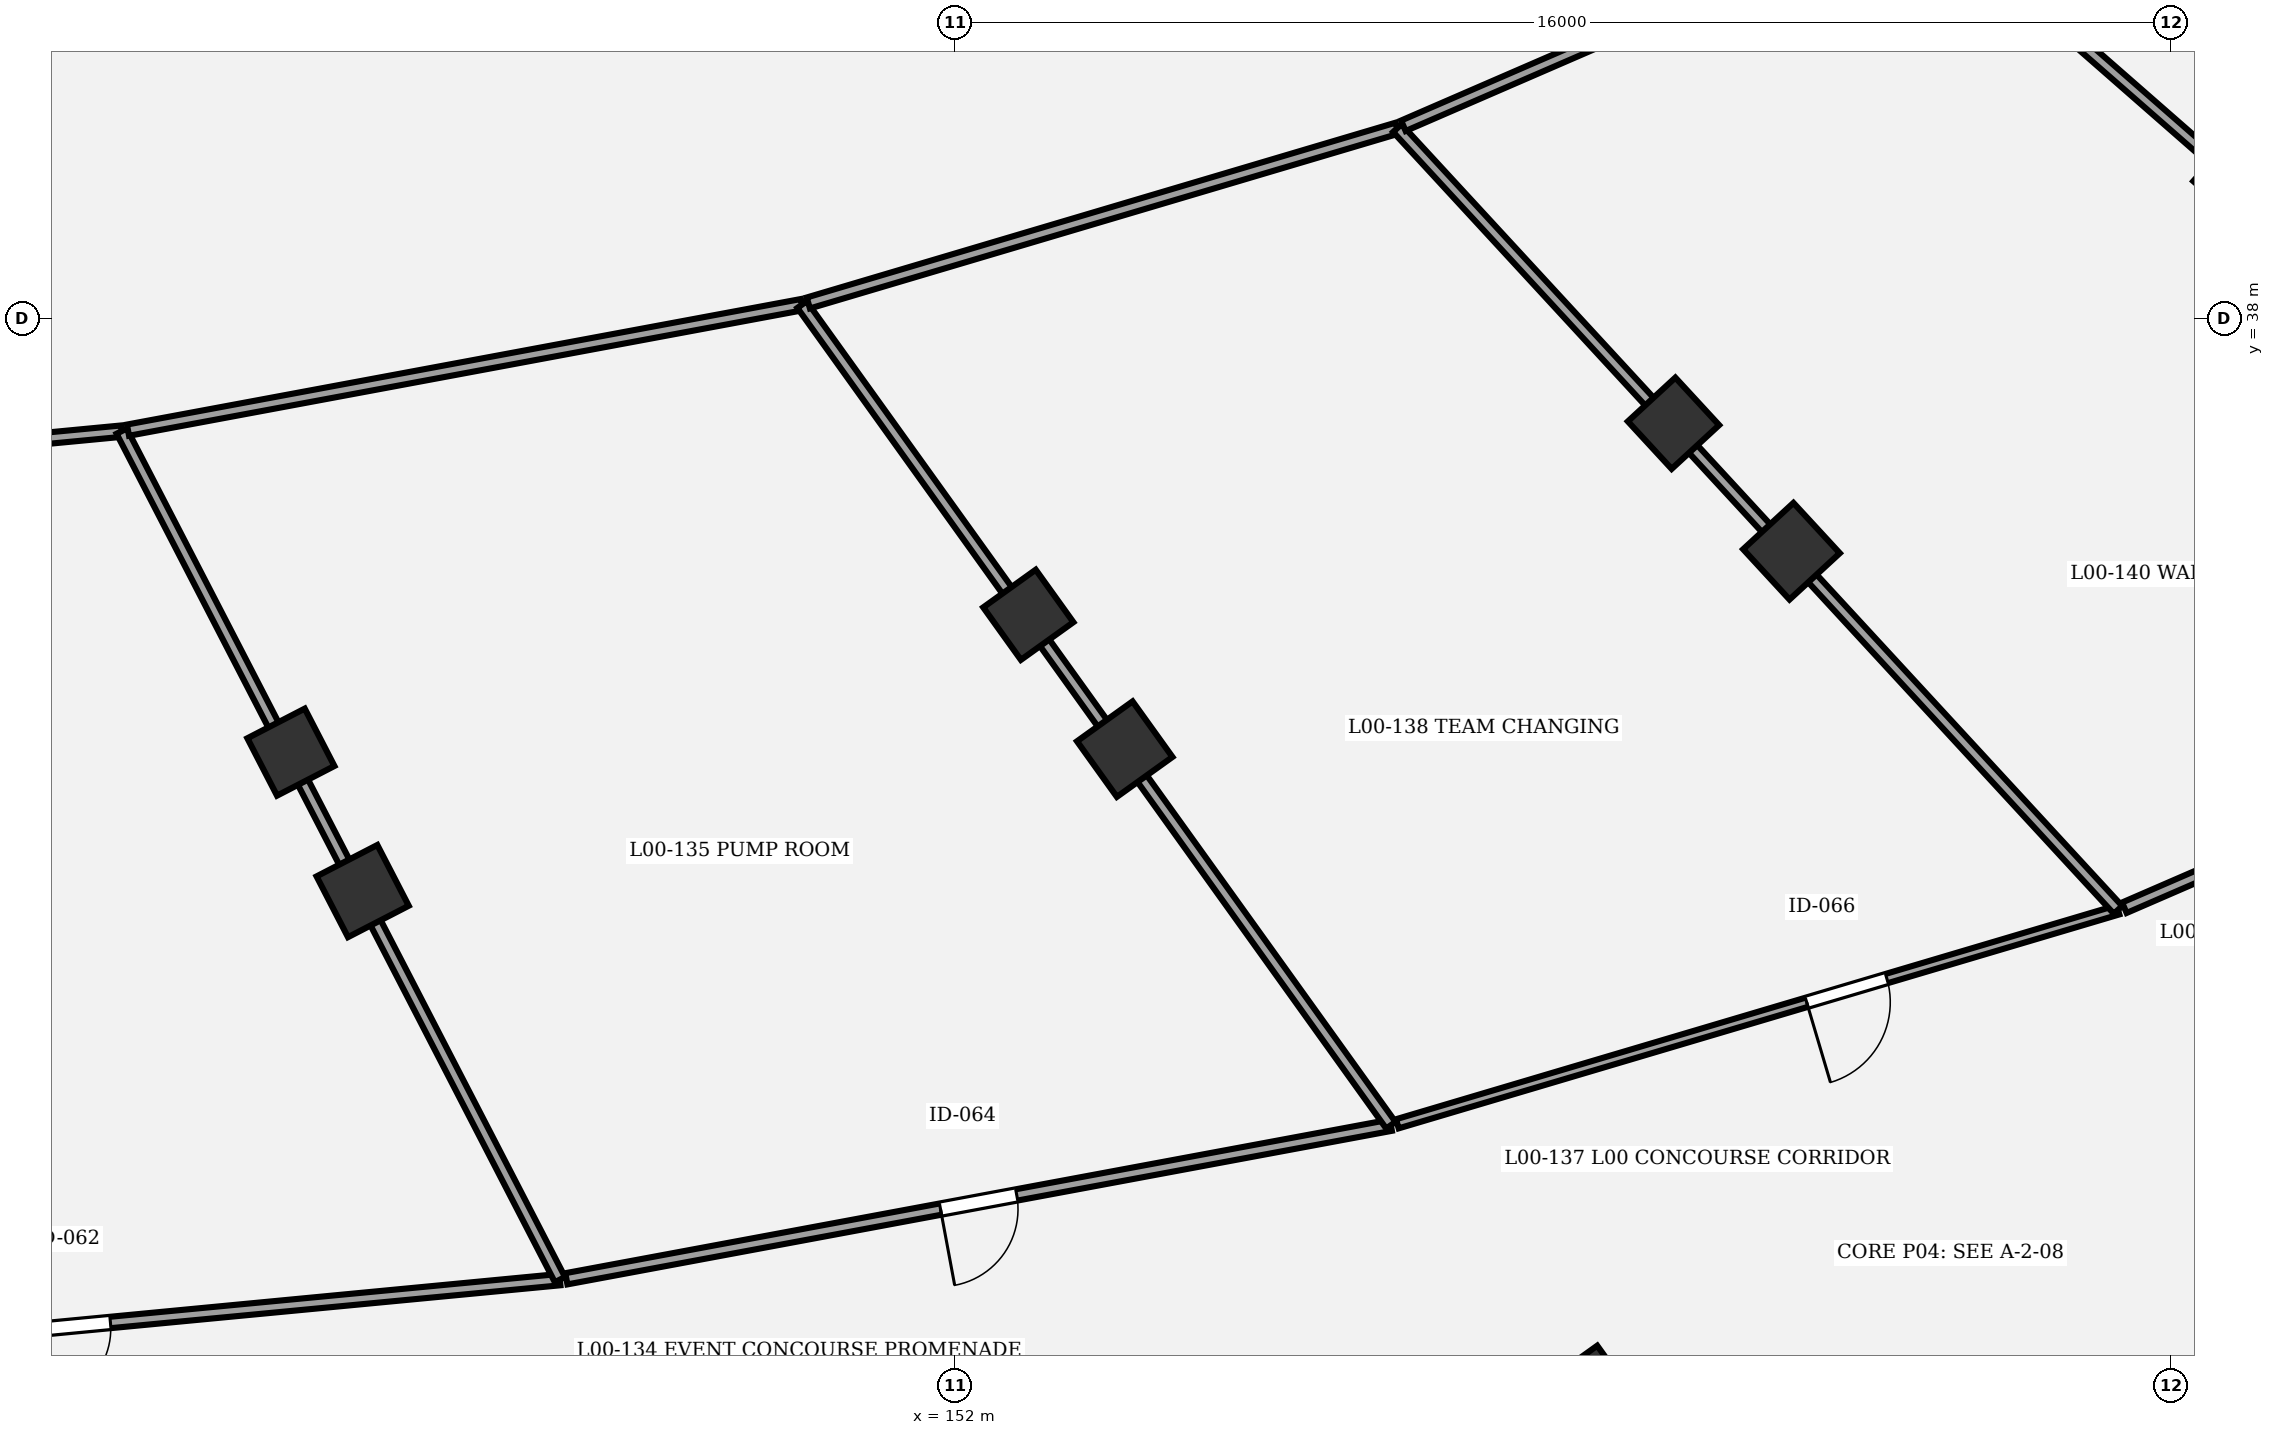
"""IFC4 building model, lengths in metres.
Left out: names, types, materials, properties, quantities, classifications, styles, units other than length and angle.
Written with IfcOpenShell. Run it as: python <this file> out.ifc"""

import sys

from ifc_helpers import new_model, si_unit, direction, frame, frame_2d, origin, origin_2d, place, context, subcontext, project, spatial, rectangle, extrude, element, fill, save


model = new_model("IFC4")
c1 = context("Model", 3, precision=1e-05, world=origin(), true_north=direction((0.0, 1.0)))
c2 = subcontext(c1, "Body", "Model", "MODEL_VIEW")
j1 = project(units=[si_unit("LENGTHUNIT", "METRE"), si_unit("PLANEANGLEUNIT", "RADIAN")], contexts=[c1])
p1 = place(None, origin())
s1 = spatial("IfcSite", under=j1, at=p1, CompositionType="ELEMENT")
p2 = place(p1, origin())
s2 = spatial("IfcBuilding", under=s1, at=p2, CompositionType="ELEMENT")
p3 = place(p2, origin())
s3 = spatial("IfcBuildingStorey", under=s2, at=p3, CompositionType="ELEMENT", Elevation=0.0)
p4 = place(p3, frame((143.259, 32.294, 0.0), z_axis=(0.0, 0.0, 1.0), x_axis=(0.458959712465, -0.888457079624, 0.0)))
e1 = element("IfcColumn", 1, at=p4, inside=s3, PredefinedType="COLUMN", context=c2, shape_type="SweptSolid", body=[
    extrude(rectangle(XDim=0.85, YDim=0.85, at=origin_2d()), origin(), (0.0, 0.0, 1.0), 5.4),
])
p5 = place(p3, frame((144.204, 30.466, 0.0), z_axis=(0.0, 0.0, 1.0), x_axis=(0.458959712465, -0.888457079624, 0.0)))
e2 = element("IfcColumn", 2, at=p5, inside=s3, PredefinedType="COLUMN", context=c2, shape_type="SweptSolid", body=[
    extrude(rectangle(XDim=0.9, YDim=0.9, at=origin_2d()), origin(), (0.0, 0.0, 1.0), 5.4),
])
p6 = place(p3, frame((152.962, 34.101, 0.0), z_axis=(0.0, 0.0, 1.0), x_axis=(0.582974127943, -0.812490717577, 0.0)))
e3 = element("IfcColumn", 3, at=p6, inside=s3, PredefinedType="COLUMN", context=c2, shape_type="SweptSolid", body=[
    extrude(rectangle(XDim=0.85, YDim=0.85, at=origin_2d()), origin(), (0.0, 0.0, 1.0), 5.4),
])
p7 = place(p3, frame((154.23, 32.333, 0.0), z_axis=(0.0, 0.0, 1.0), x_axis=(0.582974127943, -0.812490717577, 0.0)))
e4 = element("IfcColumn", 4, at=p7, inside=s3, PredefinedType="COLUMN", context=c2, shape_type="SweptSolid", body=[
    extrude(rectangle(XDim=0.9, YDim=0.9, at=origin_2d()), origin(), (0.0, 0.0, 1.0), 5.4),
])
p8 = place(p3, frame((160.338, 23.823, 0.0), z_axis=(0.0, 0.0, 1.0), x_axis=(0.582974127943, -0.812490717577, 0.0)))
e5 = element("IfcColumn", 5, at=p8, inside=s3, PredefinedType="COLUMN", context=c2, shape_type="SweptSolid", body=[
    extrude(rectangle(XDim=0.95, YDim=0.95, at=origin_2d()), origin(), (0.0, 0.0, 1.0), 5.4),
])
p9 = place(p3, frame((161.45, 36.621, 0.0), z_axis=(0.0, 0.0, 1.0), x_axis=(0.677903094969, -0.735151272753, 0.0)))
e6 = element("IfcColumn", 6, at=p9, inside=s3, PredefinedType="COLUMN", context=c2, shape_type="SweptSolid", body=[
    extrude(rectangle(XDim=0.85, YDim=0.85, at=origin_2d()), origin(), (0.0, 0.0, 1.0), 5.4),
])
p10 = place(p3, frame((163.003, 34.938, 0.0), z_axis=(0.0, 0.0, 1.0), x_axis=(0.677903094969, -0.735151272753, 0.0)))
e7 = element("IfcColumn", 7, at=p10, inside=s3, PredefinedType="COLUMN", context=c2, shape_type="SweptSolid", body=[
    extrude(rectangle(XDim=0.9, YDim=0.9, at=origin_2d()), origin(), (0.0, 0.0, 1.0), 5.4),
])
p11 = place(p3, frame((168.889, 39.846, 0.0), z_axis=(0.0, 0.0, 1.0), x_axis=(0.752529860433, -0.658558128912, 0.0)))
e8 = element("IfcColumn", 8, at=p11, inside=s3, PredefinedType="COLUMN", context=c2, shape_type="SweptSolid", body=[
    extrude(rectangle(XDim=0.85, YDim=0.85, at=origin_2d()), origin(), (0.0, 0.0, 1.0), 5.4),
])
p12 = place(p3, frame((171.85, 25.013, 0.0), z_axis=(0.0, 0.0, 1.0), x_axis=(-0.95867342973, -0.284508796227, 0.0)))
e9 = element("IfcWall", 9, at=p12, inside=s3, PredefinedType="SHEAR", context=c2, shape_type="SweptSolid", body=[
    extrude(rectangle(XDim=8.54, YDim=0.22, at=frame_2d((4.27, 0.0))), origin(), (0.0, 0.0, 1.0), 5.15),
])
p13 = place(p12, frame((0.3, 0.0, 0.0)))
e10 = element("IfcOpeningElement", 10, at=p13, cuts=e9, PredefinedType="OPENING", context=c2, shape_type="SweptSolid", body=[
    extrude(rectangle(XDim=1.15, YDim=2.15, at=frame_2d((0.575, 1.075))), frame((0.0, 0.12, 0.0), z_axis=(0.0, -1.0, 0.0), x_axis=(1.0, 0.0, 0.0)), (0.0, 0.0, 1.0), 0.24),
])
p14 = place(p3, frame((146.799, 25.355, 0.0), z_axis=(0.0, 0.0, 1.0), x_axis=(-0.995485111947, -0.094917816515, 0.0)))
e11 = element("IfcWall", 11, at=p14, inside=s3, PredefinedType="PARTITIONING", context=c2, shape_type="SweptSolid", body=[
    extrude(rectangle(XDim=12.822, YDim=0.15, at=frame_2d((6.411, 0.0))), origin(), (0.0, 0.0, 1.0), 4.15),
])
p15 = place(p14, frame((5.941, 0.0, 0.0)))
e12 = element("IfcOpeningElement", 12, at=p15, cuts=e11, PredefinedType="OPENING", context=c2, shape_type="SweptSolid", body=[
    extrude(rectangle(XDim=0.94, YDim=2.3, at=frame_2d((0.47, 1.15))), frame((0.0, 0.085, 0.0), z_axis=(0.0, -1.0, 0.0), x_axis=(1.0, 0.0, 0.0)), (0.0, 0.0, 1.0), 0.17),
])
p16 = place(p3, frame((157.732, 27.386, 0.0), z_axis=(0.0, 0.0, 1.0), x_axis=(-0.983097372707, -0.183083466695, 0.0)))
e13 = element("IfcWall", 13, at=p16, inside=s3, PredefinedType="PARTITIONING", context=c2, shape_type="SweptSolid", body=[
    extrude(rectangle(XDim=11.035, YDim=0.15, at=frame_2d((5.517, 0.0))), origin(), (0.0, 0.0, 1.0), 4.15),
])
p17 = place(p16, frame((5.007, 0.0, 0.0)))
e14 = element("IfcOpeningElement", 14, at=p17, cuts=e13, PredefinedType="OPENING", context=c2, shape_type="SweptSolid", body=[
    extrude(rectangle(XDim=1.02, YDim=2.3, at=frame_2d((0.51, 1.15))), frame((0.0, 0.085, 0.0), z_axis=(0.0, -1.0, 0.0), x_axis=(1.0, 0.0, 0.0)), (0.0, 0.0, 1.0), 0.17),
])
p18 = place(p3, frame((167.299, 30.219, 0.0), z_axis=(0.0, 0.0, 1.0), x_axis=(-0.958655809656, -0.284568161629, 0.0)))
e15 = element("IfcWall", 15, at=p18, inside=s3, PredefinedType="PARTITIONING", context=c2, shape_type="SweptSolid", body=[
    extrude(rectangle(XDim=9.891, YDim=0.125, at=frame_2d((4.946, 0.0))), origin(), (0.0, 0.0, 1.0), 4.15),
])
p19 = place(p18, frame((3.173, 0.0, 0.0)))
e16 = element("IfcOpeningElement", 16, at=p19, cuts=e15, PredefinedType="OPENING", context=c2, shape_type="SweptSolid", body=[
    extrude(rectangle(XDim=1.1, YDim=2.3, at=frame_2d((0.55, 1.15))), frame((0.0, 0.073, 0.0), z_axis=(0.0, -1.0, 0.0), x_axis=(1.0, 0.0, 0.0)), (0.0, 0.0, 1.0), 0.145),
])
p20 = place(p3, frame((175.685, 33.846, 0.0), z_axis=(0.0, 0.0, 1.0), x_axis=(-0.917494590455, -0.397748257677, 0.0)))
e17 = element("IfcWall", 17, at=p20, inside=s3, PredefinedType="PARTITIONING", context=c2, shape_type="SweptSolid", body=[
    extrude(rectangle(XDim=9.049, YDim=0.15, at=frame_2d((4.525, 0.0))), origin(), (0.0, 0.0, 1.0), 4.15),
])
p21 = place(p20, frame((1.774, 0.0, 0.0)))
e18 = element("IfcOpeningElement", 18, at=p21, cuts=e17, PredefinedType="OPENING", context=c2, shape_type="SweptSolid", body=[
    extrude(rectangle(XDim=1.14, YDim=2.3, at=frame_2d((0.57, 1.15))), frame((0.0, 0.085, 0.0), z_axis=(0.0, -1.0, 0.0), x_axis=(1.0, 0.0, 0.0)), (0.0, 0.0, 1.0), 0.17),
])
p22 = place(p3, frame((130.595, 35.522, 0.0), z_axis=(0.0, 0.0, 1.0), x_axis=(0.99548363917, 0.094933261529, 0.0)))
e19 = element("IfcWall", 19, at=p22, inside=s3, PredefinedType="PARTITIONING", context=c2, shape_type="SweptSolid", body=[
    extrude(rectangle(XDim=10.485, YDim=0.15, at=frame_2d((5.242, 0.0))), origin(), (0.0, 0.0, 1.0), 4.15),
])
p23 = place(p3, frame((141.033, 36.517, 0.0), z_axis=(0.0, 0.0, 1.0), x_axis=(0.458958189589, -0.888457866311, 0.0)))
e20 = element("IfcWall", 20, at=p23, inside=s3, PredefinedType="PARTITIONING", context=c2, shape_type="SweptSolid", body=[
    extrude(rectangle(XDim=12.564, YDim=0.15, at=frame_2d((6.282, 0.0))), origin(), (0.0, 0.0, 1.0), 4.15),
])
p24 = place(p3, frame((141.116, 36.53, 0.0), z_axis=(0.0, 0.0, 1.0), x_axis=(0.983094830755, 0.183097115603, 0.0)))
e21 = element("IfcWall", 21, at=p24, inside=s3, PredefinedType="PARTITIONING", context=c2, shape_type="SweptSolid", body=[
    extrude(rectangle(XDim=9.021, YDim=0.15, at=frame_2d((4.51, 0.0))), origin(), (0.0, 0.0, 1.0), 4.15),
])
p25 = place(p3, frame((149.984, 38.182, 0.0), z_axis=(0.0, 0.0, 1.0), x_axis=(0.583032067708, -0.812449141808, 0.0)))
e22 = element("IfcWall", 22, at=p25, inside=s3, PredefinedType="PARTITIONING", context=c2, shape_type="SweptSolid", body=[
    extrude(rectangle(XDim=13.288, YDim=0.15, at=frame_2d((6.644, 0.0))), origin(), (0.0, 0.0, 1.0), 4.15),
])
p26 = place(p3, frame((150.067, 38.204, 0.0), z_axis=(0.0, 0.0, 1.0), x_axis=(0.958664246127, 0.284539739226, 0.0)))
e23 = element("IfcWall", 23, at=p26, inside=s3, PredefinedType="PARTITIONING", context=c2, shape_type="SweptSolid", body=[
    extrude(rectangle(XDim=8.083, YDim=0.15, at=frame_2d((4.042, 0.0))), origin(), (0.0, 0.0, 1.0), 4.15),
])
p27 = place(p3, frame((157.816, 40.504, 0.0), z_axis=(0.0, 0.0, 1.0), x_axis=(0.677850870133, -0.735199427271, 0.0)))
e24 = element("IfcWall", 24, at=p27, inside=s3, PredefinedType="PARTITIONING", context=c2, shape_type="SweptSolid", body=[
    extrude(rectangle(XDim=13.989, YDim=0.15, at=frame_2d((6.995, 0.0))), origin(), (0.0, 0.0, 1.0), 4.15),
])
p28 = place(p3, frame((157.896, 40.535, 0.0), z_axis=(0.0, 0.0, 1.0), x_axis=(0.917502611666, 0.397729754463, 0.0)))
e25 = element("IfcWall", 25, at=p28, inside=s3, PredefinedType="PARTITIONING", context=c2, shape_type="SweptSolid", body=[
    extrude(rectangle(XDim=7.394, YDim=0.15, at=frame_2d((3.697, 0.0))), origin(), (0.0, 0.0, 1.0), 4.15),
])
p29 = place(p3, frame((164.68, 43.476, 0.0), z_axis=(0.0, 0.0, 1.0), x_axis=(0.752565317778, -0.658517609846, 0.0)))
e26 = element("IfcWall", 26, at=p29, inside=s3, PredefinedType="PARTITIONING", context=c2, shape_type="SweptSolid", body=[
    extrude(rectangle(XDim=14.623, YDim=0.15, at=frame_2d((7.312, 0.0))), origin(), (0.0, 0.0, 1.0), 4.15),
])
p30 = place(p15, origin())
e27 = element("IfcDoor", 27, at=p30, inside=s3, OperationType="SINGLE_SWING_RIGHT", PredefinedType="DOOR", context=c2, shape_type="SweptSolid", body=[
    extrude(rectangle(XDim=0.94, YDim=2.3, at=frame_2d((0.47, 1.15))), frame((0.0, 0.025, 0.0), z_axis=(0.0, -1.0, 0.0), x_axis=(1.0, 0.0, 0.0)), (0.0, 0.0, 1.0), 0.05),
])
fill(e12, e27)
p31 = place(p17, origin())
e28 = element("IfcDoor", 28, at=p31, inside=s3, OperationType="SINGLE_SWING_RIGHT", PredefinedType="DOOR", context=c2, shape_type="SweptSolid", body=[
    extrude(rectangle(XDim=1.02, YDim=2.3, at=frame_2d((0.51, 1.15))), frame((0.0, 0.025, 0.0), z_axis=(0.0, -1.0, 0.0), x_axis=(1.0, 0.0, 0.0)), (0.0, 0.0, 1.0), 0.05),
])
fill(e14, e28)
p32 = place(p19, origin())
e29 = element("IfcDoor", 29, at=p32, inside=s3, OperationType="SINGLE_SWING_RIGHT", PredefinedType="DOOR", context=c2, shape_type="SweptSolid", body=[
    extrude(rectangle(XDim=1.1, YDim=2.3, at=frame_2d((0.55, 1.15))), frame((0.0, 0.025, 0.0), z_axis=(0.0, -1.0, 0.0), x_axis=(1.0, 0.0, 0.0)), (0.0, 0.0, 1.0), 0.05),
])
fill(e16, e29)
save(model, sys.argv[1])
